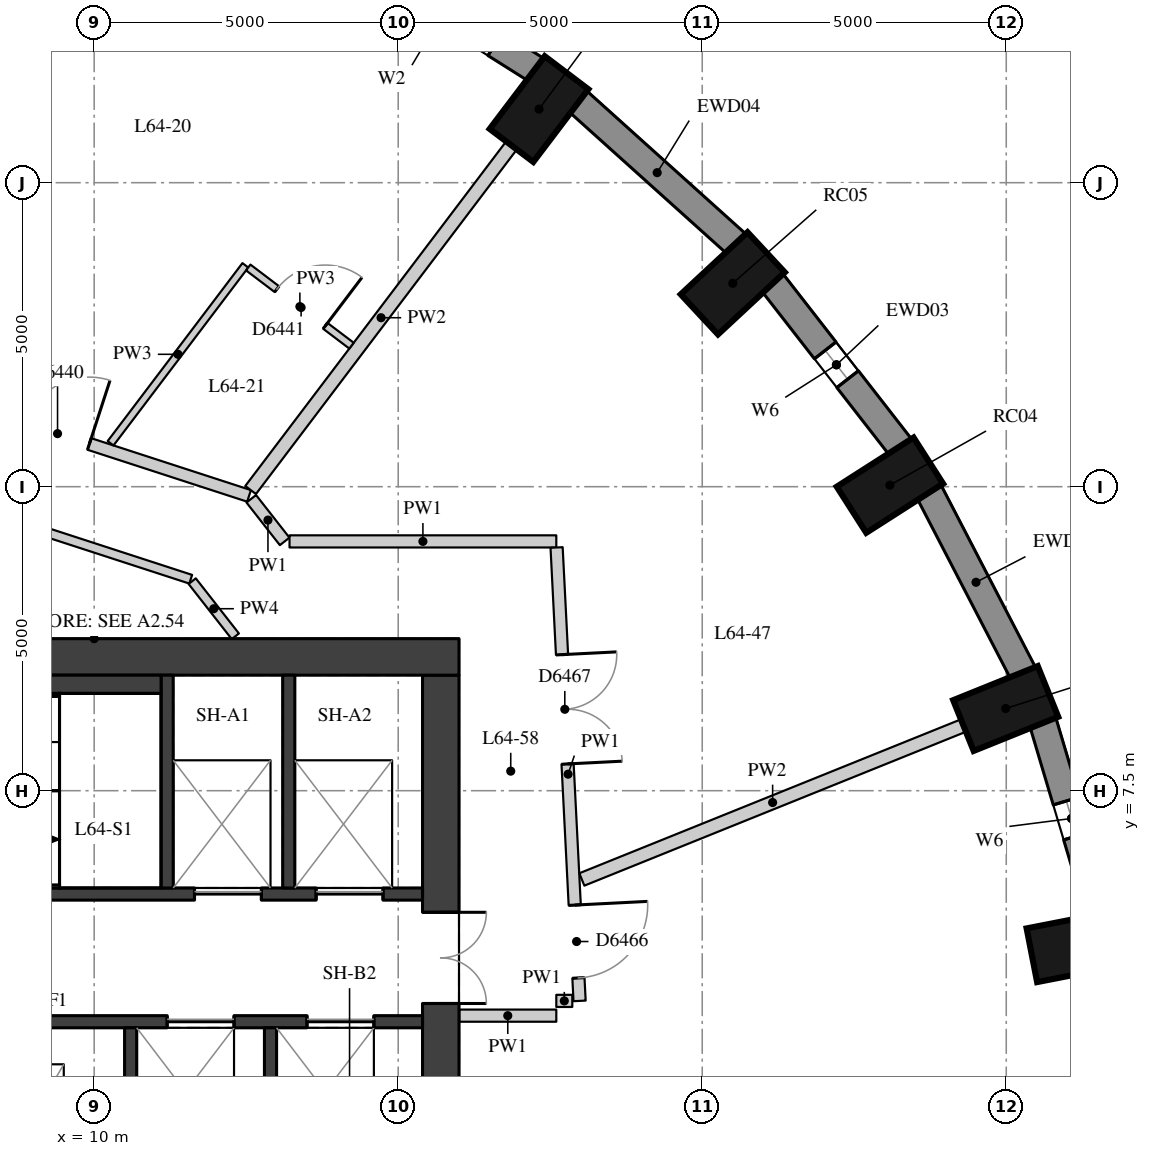
"""IFC4 building model, lengths in metres.
Left out: names, types, materials, properties, quantities, classifications, styles, units other than length and angle.
Written with IfcOpenShell. Run it as: python <this file> out.ifc"""

import sys

from ifc_helpers import new_model, si_unit, direction, frame, frame_2d, origin, origin_2d, place, context, subcontext, project, spatial, rectangle, extrude, element, fill, save


model = new_model("IFC4")
c1 = context("Model", 3, precision=1e-05, world=origin(), true_north=direction((0.0, 1.0)))
c2 = subcontext(c1, "Body", "Model", "MODEL_VIEW")
j1 = project(units=[si_unit("LENGTHUNIT", "METRE"), si_unit("PLANEANGLEUNIT", "RADIAN")], contexts=[c1])
p1 = place(None, origin())
s1 = spatial("IfcSite", under=j1, at=p1, CompositionType="ELEMENT")
p2 = place(p1, origin())
s2 = spatial("IfcBuilding", under=s1, at=p2, CompositionType="ELEMENT")
p3 = place(p2, frame((0.0, 0.0, 225.5)))
s3 = spatial("IfcBuildingStorey", under=s2, at=p3, CompositionType="ELEMENT", Elevation=225.5)
for number, where, z_axis, x_axis in (
    (1, (26.157, 4.937, 0.0), (0.0, 0.0, 1.0), (0.981, 0.192, 0.0)),
    (2, (24.991, 8.852, 0.0), (0.0, 0.0, 1.0), (0.927, 0.374, 0.0)),
    (3, (23.087, 12.525, 0.0), (0.0, 0.0, 1.0), (0.842, 0.539, 0.0)),
    (4, (20.502, 15.845, 0.0), (0.0, 0.0, 1.0), (0.732, 0.681, 0.0)),
    (5, (17.316, 18.71, 0.0), (0.0, 0.0, 1.0), (0.604, 0.797, 0.0)),
):
    element("IfcColumn", number, at=place(p3, frame(where, z_axis=z_axis, x_axis=x_axis)), inside=s3, PredefinedType="COLUMN", context=c2, shape_type="SweptSolid", body=[
        extrude(rectangle(XDim=1.5, YDim=0.9, at=origin_2d()), origin(), (0.0, 0.0, 1.0), 3.3),
    ])
p4 = place(p3, frame((26.548, 5.452, 0.0), z_axis=(0.0, 0.0, 1.0), x_axis=(-0.285444972963, 0.958395099847, 0.0)))
e6 = element("IfcWall", 6, at=p4, inside=s3, PredefinedType="SOLIDWALL", context=c2, shape_type="SweptSolid", body=[
    extrude(rectangle(XDim=3.32, YDim=0.45, at=frame_2d((1.66, 0.0))), origin(), (0.0, 0.0, 1.0), 2.85),
])
p5 = place(p4, frame((1.36, 0.0, 0.4)))
e7 = element("IfcOpeningElement", 7, at=p5, cuts=e6, PredefinedType="OPENING", context=c2, shape_type="SweptSolid", body=[
    extrude(rectangle(XDim=0.6, YDim=1.75, at=frame_2d((0.3, 0.875))), frame((0.0, 0.235, 0.0), z_axis=(0.0, -1.0, 0.0), x_axis=(1.0, 0.0, 0.0)), (0.0, 0.0, 1.0), 0.47),
])
p6 = place(p3, frame((25.278, 9.432, 0.0), z_axis=(0.0, 0.0, 1.0), x_axis=(-0.460175500475, 0.887827972505, 0.0)))
e8 = element("IfcWall", 8, at=p6, inside=s3, PredefinedType="SOLIDWALL", context=c2, shape_type="SweptSolid", body=[
    extrude(rectangle(XDim=3.371, YDim=0.45, at=frame_2d((1.685, 0.0))), origin(), (0.0, 0.0, 1.0), 2.85),
])
p7 = place(p3, frame((23.263, 13.148, 0.0), z_axis=(0.0, 0.0, 1.0), x_axis=(-0.614220816451, 0.789134201919, 0.0)))
e9 = element("IfcWall", 9, at=p7, inside=s3, PredefinedType="SOLIDWALL", context=c2, shape_type="SweptSolid", body=[
    extrude(rectangle(XDim=3.438, YDim=0.45, at=frame_2d((1.719, 0.0))), origin(), (0.0, 0.0, 1.0), 2.85),
])
p8 = place(p7, frame((1.419, 0.0, 0.4)))
e10 = element("IfcOpeningElement", 10, at=p8, cuts=e9, PredefinedType="OPENING", context=c2, shape_type="SweptSolid", body=[
    extrude(rectangle(XDim=0.6, YDim=1.75, at=frame_2d((0.3, 0.875))), frame((0.0, 0.235, 0.0), z_axis=(0.0, -1.0, 0.0), x_axis=(1.0, 0.0, 0.0)), (0.0, 0.0, 1.0), 0.47),
])
p9 = place(p3, frame((20.565, 16.49, 0.0), z_axis=(0.0, 0.0, 1.0), x_axis=(-0.743442727602, 0.668799604348, 0.0)))
e11 = element("IfcWall", 11, at=p9, inside=s3, PredefinedType="SOLIDWALL", context=c2, shape_type="SweptSolid", body=[
    extrude(rectangle(XDim=3.513, YDim=0.45, at=frame_2d((1.756, 0.0))), origin(), (0.0, 0.0, 1.0), 2.85),
])
p10 = place(p3, frame((17.267, 19.358, 0.0), z_axis=(0.0, 0.0, 1.0), x_axis=(-0.846119146727, 0.532993798783, 0.0)))
e12 = element("IfcWall", 12, at=p10, inside=s3, PredefinedType="SOLIDWALL", context=c2, shape_type="SweptSolid", body=[
    extrude(rectangle(XDim=3.587, YDim=0.45, at=frame_2d((1.793, 0.0))), origin(), (0.0, 0.0, 1.0), 2.85),
])
p11 = place(p10, frame((0.793, 0.0, 0.4)))
e13 = element("IfcOpeningElement", 13, at=p11, cuts=e12, PredefinedType="OPENING", context=c2, shape_type="SweptSolid", body=[
    extrude(rectangle(XDim=2.0, YDim=1.75, at=frame_2d((1.0, 0.875))), frame((0.0, 0.235, 0.0), z_axis=(0.0, -1.0, 0.0), x_axis=(1.0, 0.0, 0.0)), (0.0, 0.0, 1.0), 0.47),
])
p12 = place(p3, frame((15.7, -9.4, 0.0), z_axis=(0.0, 0.0, 1.0), x_axis=(0.0, 1.0, 0.0)))
e14 = element("IfcWall", 14, at=p12, inside=s3, PredefinedType="SHEAR", context=c2, shape_type="SweptSolid", body=[
    extrude(rectangle(XDim=18.8, YDim=0.6, at=frame_2d((9.4, 0.0))), origin(), (0.0, 0.0, 1.0), 2.85),
])
p13 = place(p12, frame((13.4, 0.0, 0.0)))
e15 = element("IfcOpeningElement", 15, at=p13, cuts=e14, PredefinedType="OPENING", context=c2, shape_type="SweptSolid", body=[
    extrude(rectangle(XDim=1.5, YDim=2.1, at=frame_2d((0.75, 1.05))), frame((0.0, 0.31, 0.0), z_axis=(0.0, -1.0, 0.0), x_axis=(1.0, 0.0, 0.0)), (0.0, 0.0, 1.0), 0.62),
])
p14 = place(p12, frame((3.9, 0.0, 0.0)))
e16 = element("IfcOpeningElement", 16, at=p14, cuts=e14, PredefinedType="OPENING", context=c2, shape_type="SweptSolid", body=[
    extrude(rectangle(XDim=1.5, YDim=2.1, at=frame_2d((0.75, 1.05))), frame((0.0, 0.31, 0.0), z_axis=(0.0, -1.0, 0.0), x_axis=(1.0, 0.0, 0.0)), (0.0, 0.0, 1.0), 0.62),
])
p15 = place(p3, frame((4.0, 9.7, 0.0), z_axis=(0.0, 0.0, 1.0), x_axis=(1.0, 0.0, 0.0)))
e17 = element("IfcWall", 17, at=p15, inside=s3, PredefinedType="SHEAR", context=c2, shape_type="SweptSolid", body=[
    extrude(rectangle(XDim=12.0, YDim=0.6, at=frame_2d((6.0, 0.0))), origin(), (0.0, 0.0, 1.0), 2.85),
])
p16 = place(p3, frame((4.6, 5.8, 0.0), z_axis=(0.0, 0.0, 1.0), x_axis=(1.0, 0.0, 0.0)))
e18 = element("IfcWall", 18, at=p16, inside=s3, PredefinedType="SHEAR", context=c2, shape_type="SweptSolid", body=[
    extrude(rectangle(XDim=10.8, YDim=0.2, at=frame_2d((5.4, 0.0))), origin(), (0.0, 0.0, 1.0), 2.85),
])
p17 = place(p16, frame((7.05, 0.0, 0.0)))
e19 = element("IfcOpeningElement", 19, at=p17, cuts=e18, PredefinedType="OPENING", context=c2, shape_type="SweptSolid", body=[
    extrude(rectangle(XDim=1.1, YDim=2.1, at=frame_2d((0.55, 1.05))), frame((0.0, 0.11, 0.0), z_axis=(0.0, -1.0, 0.0), x_axis=(1.0, 0.0, 0.0)), (0.0, 0.0, 1.0), 0.22),
])
p18 = place(p16, frame((9.05, 0.0, 0.0)))
e20 = element("IfcOpeningElement", 20, at=p18, cuts=e18, PredefinedType="OPENING", context=c2, shape_type="SweptSolid", body=[
    extrude(rectangle(XDim=1.1, YDim=2.1, at=frame_2d((0.55, 1.05))), frame((0.0, 0.11, 0.0), z_axis=(0.0, -1.0, 0.0), x_axis=(1.0, 0.0, 0.0)), (0.0, 0.0, 1.0), 0.22),
])
p19 = place(p3, frame((4.6, 3.7, 0.0), z_axis=(0.0, 0.0, 1.0), x_axis=(1.0, 0.0, 0.0)))
e21 = element("IfcWall", 21, at=p19, inside=s3, PredefinedType="SHEAR", context=c2, shape_type="SweptSolid", body=[
    extrude(rectangle(XDim=10.8, YDim=0.2, at=frame_2d((5.4, 0.0))), origin(), (0.0, 0.0, 1.0), 2.85),
])
p20 = place(p19, frame((6.6, 0.0, 0.0)))
e22 = element("IfcOpeningElement", 22, at=p20, cuts=e21, PredefinedType="OPENING", context=c2, shape_type="SweptSolid", body=[
    extrude(rectangle(XDim=1.1, YDim=2.1, at=frame_2d((0.55, 1.05))), frame((0.0, 0.11, 0.0), z_axis=(0.0, -1.0, 0.0), x_axis=(1.0, 0.0, 0.0)), (0.0, 0.0, 1.0), 0.22),
])
p21 = place(p19, frame((8.9, 0.0, 0.0)))
e23 = element("IfcOpeningElement", 23, at=p21, cuts=e21, PredefinedType="OPENING", context=c2, shape_type="SweptSolid", body=[
    extrude(rectangle(XDim=1.1, YDim=2.1, at=frame_2d((0.55, 1.05))), frame((0.0, 0.11, 0.0), z_axis=(0.0, -1.0, 0.0), x_axis=(1.0, 0.0, 0.0)), (0.0, 0.0, 1.0), 0.22),
])
for number, where, z_axis, x_axis in (
    (24, (11.2, 5.9, 0.0), (0.0, 0.0, 1.0), (0.0, 1.0, 0.0)),
    (25, (13.2, 5.9, 0.0), (0.0, 0.0, 1.0), (0.0, 1.0, 0.0)),
):
    element("IfcWall", number, at=place(p3, frame(where, z_axis=z_axis, x_axis=x_axis)), inside=s3, PredefinedType="SHEAR", context=c2, shape_type="SweptSolid", body=[
        extrude(rectangle(XDim=3.5, YDim=0.2, at=frame_2d((1.75, 0.0))), origin(), (0.0, 0.0, 1.0), 2.85),
    ])
for number, where, z_axis, x_axis in (
    (26, (10.6, 1.1, 0.0), (0.0, 0.0, 1.0), (0.0, 1.0, 0.0)),
    (27, (12.9, 1.1, 0.0), (0.0, 0.0, 1.0), (0.0, 1.0, 0.0)),
):
    element("IfcWall", number, at=place(p3, frame(where, z_axis=z_axis, x_axis=x_axis)), inside=s3, PredefinedType="SHEAR", context=c2, shape_type="SweptSolid", body=[
        extrude(rectangle(XDim=2.5, YDim=0.2, at=frame_2d((1.25, 0.0))), origin(), (0.0, 0.0, 1.0), 2.85),
    ])
p22 = place(p3, frame((6.22, 9.25, 0.0), z_axis=(0.0, 0.0, 1.0), x_axis=(1.0, 0.0, 0.0)))
e28 = element("IfcWall", 28, at=p22, inside=s3, PredefinedType="PARTITIONING", context=c2, shape_type="SweptSolid", body=[
    extrude(rectangle(XDim=4.88, YDim=0.3, at=frame_2d((2.44, 0.0))), origin(), (0.0, 0.0, 1.0), 2.85),
])
p23 = place(p3, frame((0.795, 16.169, 0.0), z_axis=(0.0, 0.0, 1.0), x_axis=(0.950998491074, -0.309195520626, 0.0)))
e29 = element("IfcWall", 29, at=p23, inside=s3, PredefinedType="PARTITIONING", context=c2, shape_type="SweptSolid", body=[
    extrude(rectangle(XDim=12.357, YDim=0.2, at=frame_2d((6.179, 0.0))), origin(), (0.0, 0.0, 1.0), 2.85),
])
p24 = place(p23, frame((8.496, 0.0, 0.0)))
e30 = element("IfcOpeningElement", 30, at=p24, cuts=e29, PredefinedType="OPENING", context=c2, shape_type="SweptSolid", body=[
    extrude(rectangle(XDim=1.1, YDim=2.1, at=frame_2d((0.55, 1.05))), frame((0.0, 0.11, 0.0), z_axis=(0.0, -1.0, 0.0), x_axis=(1.0, 0.0, 0.0)), (0.0, 0.0, 1.0), 0.22),
])
p25 = place(p23, frame((4.169, 0.0, 0.0)))
e31 = element("IfcOpeningElement", 31, at=p25, cuts=e29, PredefinedType="OPENING", context=c2, shape_type="SweptSolid", body=[
    extrude(rectangle(XDim=0.9, YDim=2.1, at=frame_2d((0.45, 1.05))), frame((0.0, 0.11, 0.0), z_axis=(0.0, -1.0, 0.0), x_axis=(1.0, 0.0, 0.0)), (0.0, 0.0, 1.0), 0.22),
])
p26 = place(p23, frame((0.747, 0.0, 0.0)))
e32 = element("IfcOpeningElement", 32, at=p26, cuts=e29, PredefinedType="OPENING", context=c2, shape_type="SweptSolid", body=[
    extrude(rectangle(XDim=0.9, YDim=2.1, at=frame_2d((0.45, 1.05))), frame((0.0, 0.11, 0.0), z_axis=(0.0, -1.0, 0.0), x_axis=(1.0, 0.0, 0.0)), (0.0, 0.0, 1.0), 0.22),
])
p27 = place(p3, frame((12.583, 12.301, 0.0), z_axis=(0.0, 0.0, 1.0), x_axis=(0.616670471626, -0.787221397972, 0.0)))
e33 = element("IfcWall", 33, at=p27, inside=s3, PredefinedType="PARTITIONING", context=c2, shape_type="SweptSolid", body=[
    extrude(rectangle(XDim=0.89, YDim=0.2, at=frame_2d((0.445, 0.0))), origin(), (0.0, 0.0, 1.0), 2.85),
])
p28 = place(p3, frame((13.213, 11.6, 0.0), z_axis=(0.0, 0.0, 1.0), x_axis=(1.0, 0.0, 0.0)))
e34 = element("IfcWall", 34, at=p28, inside=s3, PredefinedType="PARTITIONING", context=c2, shape_type="SweptSolid", body=[
    extrude(rectangle(XDim=4.387, YDim=0.2, at=frame_2d((2.194, 0.0))), origin(), (0.0, 0.0, 1.0), 2.85),
])
p29 = place(p3, frame((17.605, 11.5, 0.0), z_axis=(0.0, 0.0, 1.0), x_axis=(0.050646981223, -0.998716618112, 0.0)))
e35 = element("IfcWall", 35, at=p29, inside=s3, PredefinedType="PARTITIONING", context=c2, shape_type="SweptSolid", body=[
    extrude(rectangle(XDim=7.467, YDim=0.2, at=frame_2d((3.733, 0.0))), origin(), (0.0, 0.0, 1.0), 2.85),
])
p30 = place(p29, frame((5.889, 0.0, 0.0)))
e36 = element("IfcOpeningElement", 36, at=p30, cuts=e35, PredefinedType="OPENING", context=c2, shape_type="SweptSolid", body=[
    extrude(rectangle(XDim=1.2, YDim=2.1, at=frame_2d((0.6, 1.05))), frame((0.0, 0.11, 0.0), z_axis=(0.0, -1.0, 0.0), x_axis=(1.0, 0.0, 0.0)), (0.0, 0.0, 1.0), 0.22),
])
p31 = place(p29, frame((1.765, 0.0, 0.0)))
e37 = element("IfcOpeningElement", 37, at=p31, cuts=e35, PredefinedType="OPENING", context=c2, shape_type="SweptSolid", body=[
    extrude(rectangle(XDim=1.8, YDim=2.1, at=frame_2d((0.9, 1.05))), frame((0.0, 0.11, 0.0), z_axis=(0.0, -1.0, 0.0), x_axis=(1.0, 0.0, 0.0)), (0.0, 0.0, 1.0), 0.22),
])
p32 = place(p3, frame((17.863, 4.043, 0.0), z_axis=(0.0, 0.0, 1.0), x_axis=(-1.0, 0.0, 0.0)))
e38 = element("IfcWall", 38, at=p32, inside=s3, PredefinedType="PARTITIONING", context=c2, shape_type="SweptSolid", body=[
    extrude(rectangle(XDim=0.263, YDim=0.2, at=frame_2d((0.131, 0.0))), origin(), (0.0, 0.0, 1.0), 2.85),
])
p33 = place(p3, frame((17.6, 3.8, 0.0), z_axis=(0.0, 0.0, 1.0), x_axis=(-1.0, 0.0, 0.0)))
e39 = element("IfcWall", 39, at=p33, inside=s3, PredefinedType="PARTITIONING", context=c2, shape_type="SweptSolid", body=[
    extrude(rectangle(XDim=1.596, YDim=0.2, at=frame_2d((0.798, 0.0))), origin(), (0.0, 0.0, 1.0), 2.85),
])
p34 = place(p3, frame((4.699, 13.218, 0.0), z_axis=(0.0, 0.0, 1.0), x_axis=(0.95099963578, -0.30919199981, 0.0)))
e40 = element("IfcWall", 40, at=p34, inside=s3, PredefinedType="PARTITIONING", context=c2, shape_type="SweptSolid", body=[
    extrude(rectangle(XDim=7.244, YDim=0.15, at=frame_2d((3.622, 0.0))), origin(), (0.0, 0.0, 1.0), 2.85),
])
p35 = place(p3, frame((11.612, 10.946, 0.0), z_axis=(0.0, 0.0, 1.0), x_axis=(0.616228210046, -0.787567643535, 0.0)))
e41 = element("IfcWall", 41, at=p35, inside=s3, PredefinedType="PARTITIONING", context=c2, shape_type="SweptSolid", body=[
    extrude(rectangle(XDim=1.151, YDim=0.15, at=frame_2d((0.576, 0.0))), origin(), (0.0, 0.0, 1.0), 2.85),
])
p36 = place(p3, frame((24.295, 8.571, 0.0), z_axis=(0.0, 0.0, 1.0), x_axis=(-0.927397869515, -0.374076451569, 0.0)))
e42 = element("IfcWall", 42, at=p36, inside=s3, PredefinedType="PARTITIONING", context=c2, shape_type="SweptSolid", body=[
    extrude(rectangle(XDim=6.767, YDim=0.22, at=frame_2d((3.383, 0.0))), origin(), (0.0, 0.0, 1.0), 2.85),
])
p37 = place(p3, frame((16.863, 18.113, 0.0), z_axis=(0.0, 0.0, 1.0), x_axis=(-0.603604387564, -0.79728397909, 0.0)))
e43 = element("IfcWall", 43, at=p37, inside=s3, PredefinedType="PARTITIONING", context=c2, shape_type="SweptSolid", body=[
    extrude(rectangle(XDim=7.108, YDim=0.22, at=frame_2d((3.554, 0.0))), origin(), (0.0, 0.0, 1.0), 2.85),
])
p38 = place(p3, frame((9.307, 22.035, 0.0), z_axis=(0.0, 0.0, 1.0), x_axis=(-0.311971255232, -0.950091540805, 0.0)))
e44 = element("IfcWall", 44, at=p38, inside=s3, PredefinedType="PARTITIONING", context=c2, shape_type="SweptSolid", body=[
    extrude(rectangle(XDim=8.111, YDim=0.22, at=frame_2d((4.055, 0.0))), origin(), (0.0, 0.0, 1.0), 2.85),
])
p39 = place(p3, frame((10.27, 13.214, 0.0), z_axis=(0.0, 0.0, 1.0), x_axis=(0.603632344714, 0.797262812638, 0.0)))
e45 = element("IfcWall", 45, at=p39, inside=s3, PredefinedType="PARTITIONING", context=c2, shape_type="SweptSolid", body=[
    extrude(rectangle(XDim=3.672, YDim=0.12, at=frame_2d((1.836, 0.0))), origin(), (0.0, 0.0, 1.0), 2.85),
])
p40 = place(p3, frame((12.534, 16.105, 0.0), z_axis=(0.0, 0.0, 1.0), x_axis=(0.797282665226, -0.603606123005, 0.0)))
e46 = element("IfcWall", 46, at=p40, inside=s3, PredefinedType="PARTITIONING", context=c2, shape_type="SweptSolid", body=[
    extrude(rectangle(XDim=2.13, YDim=0.12, at=frame_2d((1.065, 0.0))), origin(), (0.0, 0.0, 1.0), 2.85),
])
p41 = place(p40, frame((0.59, 0.0, 0.0)))
e47 = element("IfcOpeningElement", 47, at=p41, cuts=e46, PredefinedType="OPENING", context=c2, shape_type="SweptSolid", body=[
    extrude(rectangle(XDim=1.0, YDim=2.1, at=frame_2d((0.5, 1.05))), frame((0.0, 0.07, 0.0), z_axis=(0.0, -1.0, 0.0), x_axis=(1.0, 0.0, 0.0)), (0.0, 0.0, 1.0), 0.14),
])
p42 = place(p5, origin())
e48 = element("IfcWindow", 48, at=p42, inside=s3, PartitioningType="SINGLE_PANEL", PredefinedType="WINDOW", context=c2, shape_type="SweptSolid", body=[
    extrude(rectangle(XDim=0.6, YDim=1.75, at=frame_2d((0.3, 0.875))), frame((0.0, 0.035, 0.0), z_axis=(0.0, -1.0, 0.0), x_axis=(1.0, 0.0, 0.0)), (0.0, 0.0, 1.0), 0.06),
])
fill(e7, e48)
p43 = place(p8, origin())
e49 = element("IfcWindow", 49, at=p43, inside=s3, PartitioningType="SINGLE_PANEL", PredefinedType="WINDOW", context=c2, shape_type="SweptSolid", body=[
    extrude(rectangle(XDim=0.6, YDim=1.75, at=frame_2d((0.3, 0.875))), frame((0.0, 0.035, 0.0), z_axis=(0.0, -1.0, 0.0), x_axis=(1.0, 0.0, 0.0)), (0.0, 0.0, 1.0), 0.06),
])
fill(e10, e49)
p44 = place(p13, origin())
e50 = element("IfcDoor", 50, at=p44, inside=s3, OperationType="DOUBLE_DOOR_SINGLE_SWING", PredefinedType="DOOR", context=c2, shape_type="SweptSolid", body=[
    extrude(rectangle(XDim=1.5, YDim=2.1, at=frame_2d((0.75, 1.05))), frame((0.0, 0.025, 0.0), z_axis=(0.0, -1.0, 0.0), x_axis=(1.0, 0.0, 0.0)), (0.0, 0.0, 1.0), 0.05),
])
fill(e15, e50)
p45 = place(p17, origin())
e51 = element("IfcDoor", 51, at=p45, inside=s3, OperationType="DOUBLE_DOOR_SLIDING", PredefinedType="DOOR", context=c2, shape_type="SweptSolid", body=[
    extrude(rectangle(XDim=1.1, YDim=2.1, at=frame_2d((0.55, 1.05))), frame((0.0, 0.025, 0.0), z_axis=(0.0, -1.0, 0.0), x_axis=(1.0, 0.0, 0.0)), (0.0, 0.0, 1.0), 0.05),
])
fill(e19, e51)
p46 = place(p18, origin())
e52 = element("IfcDoor", 52, at=p46, inside=s3, OperationType="DOUBLE_DOOR_SLIDING", PredefinedType="DOOR", context=c2, shape_type="SweptSolid", body=[
    extrude(rectangle(XDim=1.1, YDim=2.1, at=frame_2d((0.55, 1.05))), frame((0.0, 0.025, 0.0), z_axis=(0.0, -1.0, 0.0), x_axis=(1.0, 0.0, 0.0)), (0.0, 0.0, 1.0), 0.05),
])
fill(e20, e52)
p47 = place(p20, origin())
e53 = element("IfcDoor", 53, at=p47, inside=s3, OperationType="DOUBLE_DOOR_SLIDING", PredefinedType="DOOR", context=c2, shape_type="SweptSolid", body=[
    extrude(rectangle(XDim=1.1, YDim=2.1, at=frame_2d((0.55, 1.05))), frame((0.0, 0.025, 0.0), z_axis=(0.0, -1.0, 0.0), x_axis=(1.0, 0.0, 0.0)), (0.0, 0.0, 1.0), 0.05),
])
fill(e22, e53)
p48 = place(p21, origin())
e54 = element("IfcDoor", 54, at=p48, inside=s3, OperationType="DOUBLE_DOOR_SLIDING", PredefinedType="DOOR", context=c2, shape_type="SweptSolid", body=[
    extrude(rectangle(XDim=1.1, YDim=2.1, at=frame_2d((0.55, 1.05))), frame((0.0, 0.025, 0.0), z_axis=(0.0, -1.0, 0.0), x_axis=(1.0, 0.0, 0.0)), (0.0, 0.0, 1.0), 0.05),
])
fill(e23, e54)
p49 = place(p24, origin())
e55 = element("IfcDoor", 55, at=p49, inside=s3, OperationType="SINGLE_SWING_RIGHT", PredefinedType="DOOR", context=c2, shape_type="SweptSolid", body=[
    extrude(rectangle(XDim=1.1, YDim=2.1, at=frame_2d((0.55, 1.05))), frame((0.0, 0.025, 0.0), z_axis=(0.0, -1.0, 0.0), x_axis=(1.0, 0.0, 0.0)), (0.0, 0.0, 1.0), 0.05),
])
fill(e30, e55)
p50 = place(p41, origin())
e56 = element("IfcDoor", 56, at=p50, inside=s3, OperationType="SINGLE_SWING_RIGHT", PredefinedType="DOOR", context=c2, shape_type="SweptSolid", body=[
    extrude(rectangle(XDim=1.0, YDim=2.1, at=frame_2d((0.5, 1.05))), frame((0.0, 0.025, 0.0), z_axis=(0.0, -1.0, 0.0), x_axis=(1.0, 0.0, 0.0)), (0.0, 0.0, 1.0), 0.05),
])
fill(e47, e56)
p51 = place(p30, origin())
e57 = element("IfcDoor", 57, at=p51, inside=s3, OperationType="SINGLE_SWING_LEFT", PredefinedType="DOOR", context=c2, shape_type="SweptSolid", body=[
    extrude(rectangle(XDim=1.2, YDim=2.1, at=frame_2d((0.6, 1.05))), frame((0.0, 0.025, 0.0), z_axis=(0.0, -1.0, 0.0), x_axis=(1.0, 0.0, 0.0)), (0.0, 0.0, 1.0), 0.05),
])
fill(e36, e57)
p52 = place(p31, origin())
e58 = element("IfcDoor", 58, at=p52, inside=s3, OperationType="DOUBLE_DOOR_SINGLE_SWING", PredefinedType="DOOR", context=c2, shape_type="SweptSolid", body=[
    extrude(rectangle(XDim=1.8, YDim=2.1, at=frame_2d((0.9, 1.05))), frame((0.0, 0.025, 0.0), z_axis=(0.0, -1.0, 0.0), x_axis=(1.0, 0.0, 0.0)), (0.0, 0.0, 1.0), 0.05),
])
fill(e37, e58)
save(model, sys.argv[1])
